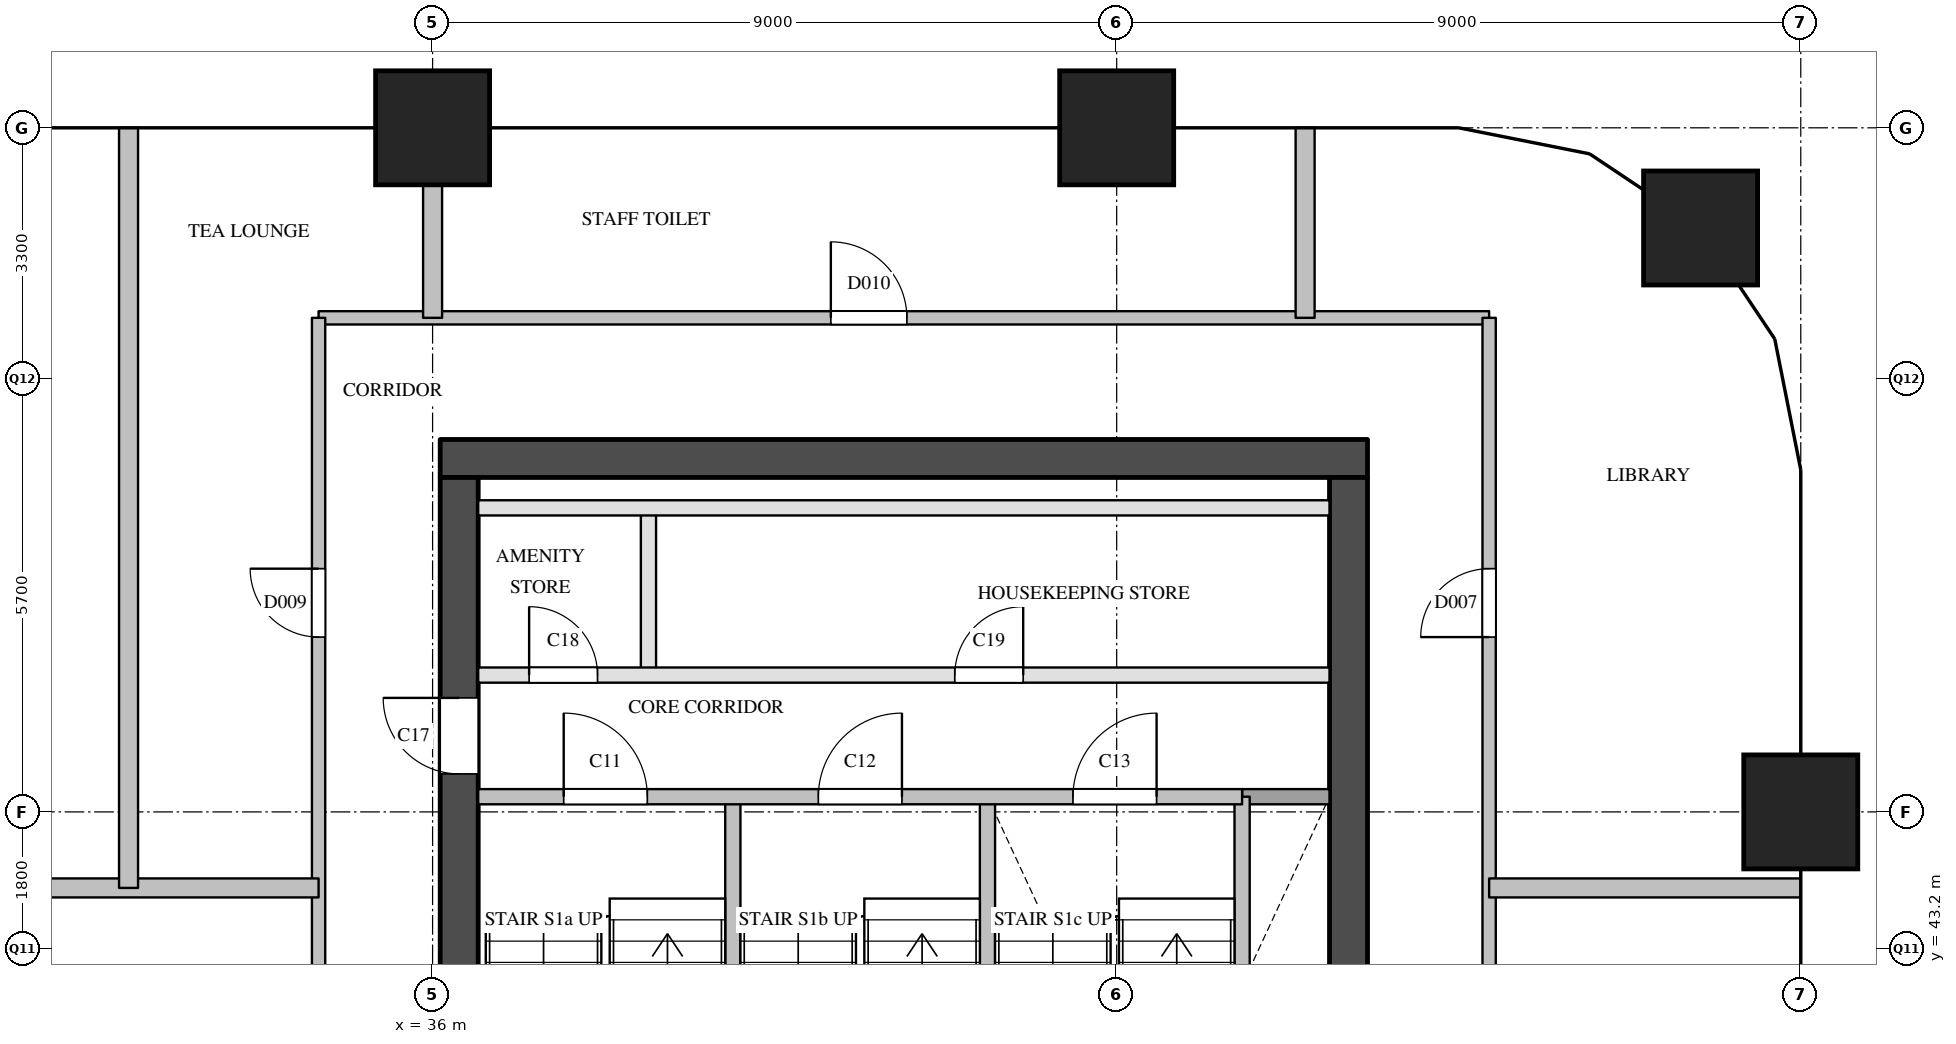
"""IFC4 building model, lengths in metres.
Left out: names, types, materials, properties, quantities, classifications, styles, units other than length and angle.
Written with IfcOpenShell. Run it as: python <this file> out.ifc"""

import sys

from ifc_helpers import new_model, si_unit, direction, frame, frame_2d, origin, origin_2d, place, context, subcontext, project, spatial, rectangle, extrude, element, fill, save


model = new_model("IFC4")
c1 = context("Model", 3, precision=1e-05, world=origin(), true_north=direction((0.0, 1.0)))
c2 = subcontext(c1, "Body", "Model", "MODEL_VIEW")
j1 = project(units=[si_unit("LENGTHUNIT", "METRE"), si_unit("PLANEANGLEUNIT", "RADIAN")], contexts=[c1])
p1 = place(None, origin())
s1 = spatial("IfcSite", under=j1, at=p1, CompositionType="ELEMENT")
p2 = place(p1, origin())
s2 = spatial("IfcBuilding", under=s1, at=p2, CompositionType="ELEMENT")
p3 = place(p2, frame((0.0, 0.0, 138.8)))
s3 = spatial("IfcBuildingStorey", under=s2, at=p3, CompositionType="ELEMENT", Elevation=138.8)
for number, where, z_axis, x_axis in (
    (1, (36.0, 54.0, 0.0), (0.0, 0.0, 1.0), (1.0, 0.0, 0.0)),
    (2, (45.0, 54.0, 0.0), (0.0, 0.0, 1.0), (1.0, 0.0, 0.0)),
    (3, (54.0, 45.0, 0.0), (0.0, 0.0, 1.0), (1.0, 0.0, 0.0)),
    (4, (52.682, 52.682, 0.0), (0.0, 0.0, 1.0), (1.0, 0.0, 0.0)),
):
    element("IfcColumn", number, at=place(p3, frame(where, z_axis=z_axis, x_axis=x_axis)), inside=s3, PredefinedType="COLUMN", context=c2, shape_type="SweptSolid", body=[
        extrude(rectangle(XDim=1.5, YDim=1.5, at=origin_2d()), origin(), (0.0, 0.0, 1.0), 3.9),
    ])
p4 = place(p3, frame((36.1, 49.65, 0.0), z_axis=(0.0, 0.0, 1.0), x_axis=(1.0, 0.0, 0.0)))
e5 = element("IfcWall", 5, at=p4, inside=s3, PredefinedType="SHEAR", context=c2, shape_type="SweptSolid", body=[
    extrude(rectangle(XDim=12.2, YDim=0.5, at=frame_2d((6.1, 0.0))), origin(), (0.0, 0.0, 1.0), 3.6),
])
p5 = place(p3, frame((36.35, 29.1, 0.0), z_axis=(0.0, 0.0, 1.0), x_axis=(0.0, 1.0, 0.0)))
e6 = element("IfcWall", 6, at=p5, inside=s3, PredefinedType="SHEAR", context=c2, shape_type="SweptSolid", body=[
    extrude(rectangle(XDim=20.3, YDim=0.5, at=frame_2d((10.15, 0.0))), origin(), (0.0, 0.0, 1.0), 3.6),
])
p6 = place(p5, frame((3.6, 0.0, 0.0)))
e7 = element("IfcOpeningElement", 7, at=p6, cuts=e6, PredefinedType="OPENING", context=c2, shape_type="SweptSolid", body=[
    extrude(rectangle(XDim=1.8, YDim=2.1, at=frame_2d((0.9, 1.05))), frame((0.0, 0.26, 0.0), z_axis=(0.0, -1.0, 0.0), x_axis=(1.0, 0.0, 0.0)), (0.0, 0.0, 1.0), 0.52),
])
p7 = place(p5, frame((16.4, 0.0, 0.0)))
e8 = element("IfcOpeningElement", 8, at=p7, cuts=e6, PredefinedType="OPENING", context=c2, shape_type="SweptSolid", body=[
    extrude(rectangle(XDim=1.0, YDim=2.1, at=frame_2d((0.5, 1.05))), frame((0.0, 0.26, 0.0), z_axis=(0.0, -1.0, 0.0), x_axis=(1.0, 0.0, 0.0)), (0.0, 0.0, 1.0), 0.52),
])
p8 = place(p3, frame((48.05, 29.1, 0.0), z_axis=(0.0, 0.0, 1.0), x_axis=(0.0, 1.0, 0.0)))
e9 = element("IfcWall", 9, at=p8, inside=s3, PredefinedType="SHEAR", context=c2, shape_type="SweptSolid", body=[
    extrude(rectangle(XDim=20.3, YDim=0.5, at=frame_2d((10.15, 0.0))), origin(), (0.0, 0.0, 1.0), 3.6),
])
p9 = place(p8, frame((12.5, 0.0, 0.0)))
e10 = element("IfcOpeningElement", 10, at=p9, cuts=e9, PredefinedType="OPENING", context=c2, shape_type="SweptSolid", body=[
    extrude(rectangle(XDim=0.7, YDim=2.1, at=frame_2d((0.35, 1.05))), frame((0.0, 0.26, 0.0), z_axis=(0.0, -1.0, 0.0), x_axis=(1.0, 0.0, 0.0)), (0.0, 0.0, 1.0), 0.52),
])
p10 = place(p8, frame((3.9, 0.0, 0.0)))
e11 = element("IfcOpeningElement", 11, at=p10, cuts=e9, PredefinedType="OPENING", context=c2, shape_type="SweptSolid", body=[
    extrude(rectangle(XDim=1.8, YDim=2.1, at=frame_2d((0.9, 1.05))), frame((0.0, 0.26, 0.0), z_axis=(0.0, -1.0, 0.0), x_axis=(1.0, 0.0, 0.0)), (0.0, 0.0, 1.0), 0.52),
])
p11 = place(p3, frame((38.84, 46.8, 0.0), z_axis=(0.0, 0.0, 1.0), x_axis=(0.0, 1.0, 0.0)))
e12 = element("IfcWall", 12, at=p11, inside=s3, PredefinedType="PARTITIONING", context=c2, shape_type="SweptSolid", body=[
    extrude(rectangle(XDim=2.2, YDim=0.2, at=frame_2d((1.1, 0.0))), origin(), (0.0, 0.0, 1.0), 3.6),
])
for number, where, z_axis, x_axis in (
    (13, (39.95, 40.78, 0.0), (0.0, 0.0, 1.0), (0.0, 1.0, 0.0)),
    (14, (43.3, 40.78, 0.0), (0.0, 0.0, 1.0), (0.0, 1.0, 0.0)),
    (15, (46.65, 40.78, 0.0), (0.0, 0.0, 1.0), (0.0, 1.0, 0.0)),
):
    element("IfcWall", number, at=place(p3, frame(where, z_axis=z_axis, x_axis=x_axis)), inside=s3, PredefinedType="SOLIDWALL", context=c2, shape_type="SweptSolid", body=[
        extrude(rectangle(XDim=4.42, YDim=0.2, at=frame_2d((2.21, 0.0))), origin(), (0.0, 0.0, 1.0), 3.6),
    ])
p12 = place(p3, frame((46.65, 45.2, 0.0), z_axis=(0.0, 0.0, 1.0), x_axis=(1.0, 0.0, 0.0)))
e16 = element("IfcWall", 16, at=p12, inside=s3, PredefinedType="SOLIDWALL", context=c2, shape_type="SweptSolid", body=[
    extrude(rectangle(XDim=1.15, YDim=0.2, at=frame_2d((0.575, 0.0))), origin(), (0.0, 0.0, 1.0), 3.6),
])
p13 = place(p3, frame((36.6, 45.2, 0.0), z_axis=(0.0, 0.0, 1.0), x_axis=(1.0, 0.0, 0.0)))
e17 = element("IfcWall", 17, at=p13, inside=s3, PredefinedType="SOLIDWALL", context=c2, shape_type="SweptSolid", body=[
    extrude(rectangle(XDim=10.05, YDim=0.2, at=frame_2d((5.025, 0.0))), origin(), (0.0, 0.0, 1.0), 3.6),
])
p14 = place(p13, frame((1.125, 0.0, 0.0)))
e18 = element("IfcOpeningElement", 18, at=p14, cuts=e17, PredefinedType="OPENING", context=c2, shape_type="SweptSolid", body=[
    extrude(rectangle(XDim=1.1, YDim=2.1, at=frame_2d((0.55, 1.05))), frame((0.0, 0.11, 0.0), z_axis=(0.0, -1.0, 0.0), x_axis=(1.0, 0.0, 0.0)), (0.0, 0.0, 1.0), 0.22),
])
p15 = place(p13, frame((4.475, 0.0, 0.0)))
e19 = element("IfcOpeningElement", 19, at=p15, cuts=e17, PredefinedType="OPENING", context=c2, shape_type="SweptSolid", body=[
    extrude(rectangle(XDim=1.1, YDim=2.1, at=frame_2d((0.55, 1.05))), frame((0.0, 0.11, 0.0), z_axis=(0.0, -1.0, 0.0), x_axis=(1.0, 0.0, 0.0)), (0.0, 0.0, 1.0), 0.22),
])
p16 = place(p13, frame((7.825, 0.0, 0.0)))
e20 = element("IfcOpeningElement", 20, at=p16, cuts=e17, PredefinedType="OPENING", context=c2, shape_type="SweptSolid", body=[
    extrude(rectangle(XDim=1.1, YDim=2.1, at=frame_2d((0.55, 1.05))), frame((0.0, 0.11, 0.0), z_axis=(0.0, -1.0, 0.0), x_axis=(1.0, 0.0, 0.0)), (0.0, 0.0, 1.0), 0.22),
])
p17 = place(p3, frame((36.6, 46.8, 0.0), z_axis=(0.0, 0.0, 1.0), x_axis=(1.0, 0.0, 0.0)))
e21 = element("IfcWall", 21, at=p17, inside=s3, PredefinedType="PARTITIONING", context=c2, shape_type="SweptSolid", body=[
    extrude(rectangle(XDim=11.2, YDim=0.2, at=frame_2d((5.6, 0.0))), origin(), (0.0, 0.0, 1.0), 3.6),
])
p18 = place(p17, frame((0.67, 0.0, 0.0)))
e22 = element("IfcOpeningElement", 22, at=p18, cuts=e21, PredefinedType="OPENING", context=c2, shape_type="SweptSolid", body=[
    extrude(rectangle(XDim=0.9, YDim=2.1, at=frame_2d((0.45, 1.05))), frame((0.0, 0.11, 0.0), z_axis=(0.0, -1.0, 0.0), x_axis=(1.0, 0.0, 0.0)), (0.0, 0.0, 1.0), 0.22),
])
p19 = place(p17, frame((6.27, 0.0, 0.0)))
e23 = element("IfcOpeningElement", 23, at=p19, cuts=e21, PredefinedType="OPENING", context=c2, shape_type="SweptSolid", body=[
    extrude(rectangle(XDim=0.9, YDim=2.1, at=frame_2d((0.45, 1.05))), frame((0.0, 0.11, 0.0), z_axis=(0.0, -1.0, 0.0), x_axis=(1.0, 0.0, 0.0)), (0.0, 0.0, 1.0), 0.22),
])
p20 = place(p3, frame((36.6, 49.0, 0.0), z_axis=(0.0, 0.0, 1.0), x_axis=(1.0, 0.0, 0.0)))
e24 = element("IfcWall", 24, at=p20, inside=s3, PredefinedType="PARTITIONING", context=c2, shape_type="SweptSolid", body=[
    extrude(rectangle(XDim=11.2, YDim=0.2, at=frame_2d((5.6, 0.0))), origin(), (0.0, 0.0, 1.0), 3.6),
])
p21 = place(p3, frame((34.5, 51.5, 0.0), z_axis=(0.0, 0.0, 1.0), x_axis=(1.0, 0.0, 0.0)))
e25 = element("IfcWall", 25, at=p21, inside=s3, PredefinedType="PARTITIONING", context=c2, shape_type="SweptSolid", body=[
    extrude(rectangle(XDim=15.4, YDim=0.175, at=frame_2d((7.7, 0.0))), origin(), (0.0, 0.0, 1.0), 3.6),
])
p22 = place(p21, frame((6.74, 0.0, 0.0)))
e26 = element("IfcOpeningElement", 26, at=p22, cuts=e25, PredefinedType="OPENING", context=c2, shape_type="SweptSolid", body=[
    extrude(rectangle(XDim=1.0, YDim=2.1, at=frame_2d((0.5, 1.05))), frame((0.0, 0.097, 0.0), z_axis=(0.0, -1.0, 0.0), x_axis=(1.0, 0.0, 0.0)), (0.0, 0.0, 1.0), 0.195),
])
p23 = place(p3, frame((34.5, 28.5, 0.0), z_axis=(0.0, 0.0, 1.0), x_axis=(0.0, 1.0, 0.0)))
e27 = element("IfcWall", 27, at=p23, inside=s3, PredefinedType="PARTITIONING", context=c2, shape_type="SweptSolid", body=[
    extrude(rectangle(XDim=23.0, YDim=0.175, at=frame_2d((11.5, 0.0))), origin(), (0.0, 0.0, 1.0), 3.6),
])
p24 = place(p23, frame((3.3, 0.0, 0.0)))
e28 = element("IfcOpeningElement", 28, at=p24, cuts=e27, PredefinedType="OPENING", context=c2, shape_type="SweptSolid", body=[
    extrude(rectangle(XDim=0.9, YDim=2.1, at=frame_2d((0.45, 1.05))), frame((0.0, 0.097, 0.0), z_axis=(0.0, -1.0, 0.0), x_axis=(1.0, 0.0, 0.0)), (0.0, 0.0, 1.0), 0.195),
])
p25 = place(p23, frame((11.05, 0.0, 0.0)))
e29 = element("IfcOpeningElement", 29, at=p25, cuts=e27, PredefinedType="OPENING", context=c2, shape_type="SweptSolid", body=[
    extrude(rectangle(XDim=0.9, YDim=2.1, at=frame_2d((0.45, 1.05))), frame((0.0, 0.097, 0.0), z_axis=(0.0, -1.0, 0.0), x_axis=(1.0, 0.0, 0.0)), (0.0, 0.0, 1.0), 0.195),
])
p26 = place(p23, frame((18.8, 0.0, 0.0)))
e30 = element("IfcOpeningElement", 30, at=p26, cuts=e27, PredefinedType="OPENING", context=c2, shape_type="SweptSolid", body=[
    extrude(rectangle(XDim=0.9, YDim=2.1, at=frame_2d((0.45, 1.05))), frame((0.0, 0.097, 0.0), z_axis=(0.0, -1.0, 0.0), x_axis=(1.0, 0.0, 0.0)), (0.0, 0.0, 1.0), 0.195),
])
p27 = place(p3, frame((49.9, 28.5, 0.0), z_axis=(0.0, 0.0, 1.0), x_axis=(0.0, 1.0, 0.0)))
e31 = element("IfcWall", 31, at=p27, inside=s3, PredefinedType="PARTITIONING", context=c2, shape_type="SweptSolid", body=[
    extrude(rectangle(XDim=23.0, YDim=0.175, at=frame_2d((11.5, 0.0))), origin(), (0.0, 0.0, 1.0), 3.6),
])
p28 = place(p27, frame((3.3, 0.0, 0.0)))
e32 = element("IfcOpeningElement", 32, at=p28, cuts=e31, PredefinedType="OPENING", context=c2, shape_type="SweptSolid", body=[
    extrude(rectangle(XDim=0.9, YDim=2.1, at=frame_2d((0.45, 1.05))), frame((0.0, 0.097, 0.0), z_axis=(0.0, -1.0, 0.0), x_axis=(1.0, 0.0, 0.0)), (0.0, 0.0, 1.0), 0.195),
])
p29 = place(p27, frame((11.05, 0.0, 0.0)))
e33 = element("IfcOpeningElement", 33, at=p29, cuts=e31, PredefinedType="OPENING", context=c2, shape_type="SweptSolid", body=[
    extrude(rectangle(XDim=0.9, YDim=2.1, at=frame_2d((0.45, 1.05))), frame((0.0, 0.097, 0.0), z_axis=(0.0, -1.0, 0.0), x_axis=(1.0, 0.0, 0.0)), (0.0, 0.0, 1.0), 0.195),
])
p30 = place(p27, frame((18.8, 0.0, 0.0)))
e34 = element("IfcOpeningElement", 34, at=p30, cuts=e31, PredefinedType="OPENING", context=c2, shape_type="SweptSolid", body=[
    extrude(rectangle(XDim=0.9, YDim=2.1, at=frame_2d((0.45, 1.05))), frame((0.0, 0.097, 0.0), z_axis=(0.0, -1.0, 0.0), x_axis=(1.0, 0.0, 0.0)), (0.0, 0.0, 1.0), 0.195),
])
p31 = place(p3, frame((19.5, 44.0, 0.0), z_axis=(0.0, 0.0, 1.0), x_axis=(1.0, 0.0, 0.0)))
e35 = element("IfcWall", 35, at=p31, inside=s3, PredefinedType="PARTITIONING", context=c2, shape_type="SweptSolid", body=[
    extrude(rectangle(XDim=15.0, YDim=0.25, at=frame_2d((7.5, 0.0))), origin(), (0.0, 0.0, 1.0), 2.6),
])
p32 = place(p3, frame((49.9, 44.0, 0.0), z_axis=(0.0, 0.0, 1.0), x_axis=(1.0, 0.0, 0.0)))
e36 = element("IfcWall", 36, at=p32, inside=s3, PredefinedType="PARTITIONING", context=c2, shape_type="SweptSolid", body=[
    extrude(rectangle(XDim=4.1, YDim=0.25, at=frame_2d((2.05, 0.0))), origin(), (0.0, 0.0, 1.0), 2.6),
])
p33 = place(p3, frame((32.0, 44.0, 0.0), z_axis=(0.0, 0.0, 1.0), x_axis=(0.0, 1.0, 0.0)))
e37 = element("IfcWall", 37, at=p33, inside=s3, PredefinedType="PARTITIONING", context=c2, shape_type="SweptSolid", body=[
    extrude(rectangle(XDim=10.0, YDim=0.25, at=frame_2d((5.0, 0.0))), origin(), (0.0, 0.0, 1.0), 2.6),
])
p34 = place(p3, frame((36.0, 51.5, 0.0), z_axis=(0.0, 0.0, 1.0), x_axis=(0.0, 1.0, 0.0)))
e38 = element("IfcWall", 38, at=p34, inside=s3, PredefinedType="PARTITIONING", context=c2, shape_type="SweptSolid", body=[
    extrude(rectangle(XDim=2.5, YDim=0.25, at=frame_2d((1.25, 0.0))), origin(), (0.0, 0.0, 1.0), 3.6),
])
p35 = place(p3, frame((47.479, 51.5, 0.0), z_axis=(0.0, 0.0, 1.0), x_axis=(0.0, 1.0, 0.0)))
e39 = element("IfcWall", 39, at=p35, inside=s3, PredefinedType="PARTITIONING", context=c2, shape_type="SweptSolid", body=[
    extrude(rectangle(XDim=2.5, YDim=0.25, at=frame_2d((1.25, 0.0))), origin(), (0.0, 0.0, 1.0), 2.6),
])
p36 = place(p14, origin())
e40 = element("IfcDoor", 40, at=p36, inside=s3, OperationType="SINGLE_SWING_LEFT", PredefinedType="DOOR", context=c2, shape_type="SweptSolid", body=[
    extrude(rectangle(XDim=1.1, YDim=2.1, at=frame_2d((0.55, 1.05))), frame((0.0, 0.025, 0.0), z_axis=(0.0, -1.0, 0.0), x_axis=(1.0, 0.0, 0.0)), (0.0, 0.0, 1.0), 0.05),
])
fill(e18, e40)
p37 = place(p15, origin())
e41 = element("IfcDoor", 41, at=p37, inside=s3, OperationType="SINGLE_SWING_RIGHT", PredefinedType="DOOR", context=c2, shape_type="SweptSolid", body=[
    extrude(rectangle(XDim=1.1, YDim=2.1, at=frame_2d((0.55, 1.05))), frame((0.0, 0.025, 0.0), z_axis=(0.0, -1.0, 0.0), x_axis=(1.0, 0.0, 0.0)), (0.0, 0.0, 1.0), 0.05),
])
fill(e19, e41)
p38 = place(p16, origin())
e42 = element("IfcDoor", 42, at=p38, inside=s3, OperationType="SINGLE_SWING_RIGHT", PredefinedType="DOOR", context=c2, shape_type="SweptSolid", body=[
    extrude(rectangle(XDim=1.1, YDim=2.1, at=frame_2d((0.55, 1.05))), frame((0.0, 0.025, 0.0), z_axis=(0.0, -1.0, 0.0), x_axis=(1.0, 0.0, 0.0)), (0.0, 0.0, 1.0), 0.05),
])
fill(e20, e42)
p39 = place(p7, origin())
e43 = element("IfcDoor", 43, at=p39, inside=s3, OperationType="SINGLE_SWING_RIGHT", PredefinedType="DOOR", context=c2, shape_type="SweptSolid", body=[
    extrude(rectangle(XDim=1.0, YDim=2.1, at=frame_2d((0.5, 1.05))), frame((0.0, 0.025, 0.0), z_axis=(0.0, -1.0, 0.0), x_axis=(1.0, 0.0, 0.0)), (0.0, 0.0, 1.0), 0.05),
])
fill(e8, e43)
p40 = place(p18, origin())
e44 = element("IfcDoor", 44, at=p40, inside=s3, OperationType="SINGLE_SWING_LEFT", PredefinedType="DOOR", context=c2, shape_type="SweptSolid", body=[
    extrude(rectangle(XDim=0.9, YDim=2.1, at=frame_2d((0.45, 1.05))), frame((0.0, 0.025, 0.0), z_axis=(0.0, -1.0, 0.0), x_axis=(1.0, 0.0, 0.0)), (0.0, 0.0, 1.0), 0.05),
])
fill(e22, e44)
p41 = place(p19, origin())
e45 = element("IfcDoor", 45, at=p41, inside=s3, OperationType="SINGLE_SWING_RIGHT", PredefinedType="DOOR", context=c2, shape_type="SweptSolid", body=[
    extrude(rectangle(XDim=0.9, YDim=2.1, at=frame_2d((0.45, 1.05))), frame((0.0, 0.025, 0.0), z_axis=(0.0, -1.0, 0.0), x_axis=(1.0, 0.0, 0.0)), (0.0, 0.0, 1.0), 0.05),
])
fill(e23, e45)
p42 = place(p30, origin())
e46 = element("IfcDoor", 46, at=p42, inside=s3, OperationType="SINGLE_SWING_LEFT", PredefinedType="DOOR", context=c2, shape_type="SweptSolid", body=[
    extrude(rectangle(XDim=0.9, YDim=2.1, at=frame_2d((0.45, 1.05))), frame((0.0, 0.025, 0.0), z_axis=(0.0, -1.0, 0.0), x_axis=(1.0, 0.0, 0.0)), (0.0, 0.0, 1.0), 0.05),
])
fill(e34, e46)
p43 = place(p26, origin())
e47 = element("IfcDoor", 47, at=p43, inside=s3, OperationType="SINGLE_SWING_RIGHT", PredefinedType="DOOR", context=c2, shape_type="SweptSolid", body=[
    extrude(rectangle(XDim=0.9, YDim=2.1, at=frame_2d((0.45, 1.05))), frame((0.0, 0.025, 0.0), z_axis=(0.0, -1.0, 0.0), x_axis=(1.0, 0.0, 0.0)), (0.0, 0.0, 1.0), 0.05),
])
fill(e30, e47)
p44 = place(p22, origin())
e48 = element("IfcDoor", 48, at=p44, inside=s3, OperationType="SINGLE_SWING_LEFT", PredefinedType="DOOR", context=c2, shape_type="SweptSolid", body=[
    extrude(rectangle(XDim=1.0, YDim=2.1, at=frame_2d((0.5, 1.05))), frame((0.0, 0.025, 0.0), z_axis=(0.0, -1.0, 0.0), x_axis=(1.0, 0.0, 0.0)), (0.0, 0.0, 1.0), 0.05),
])
fill(e26, e48)
save(model, sys.argv[1])
